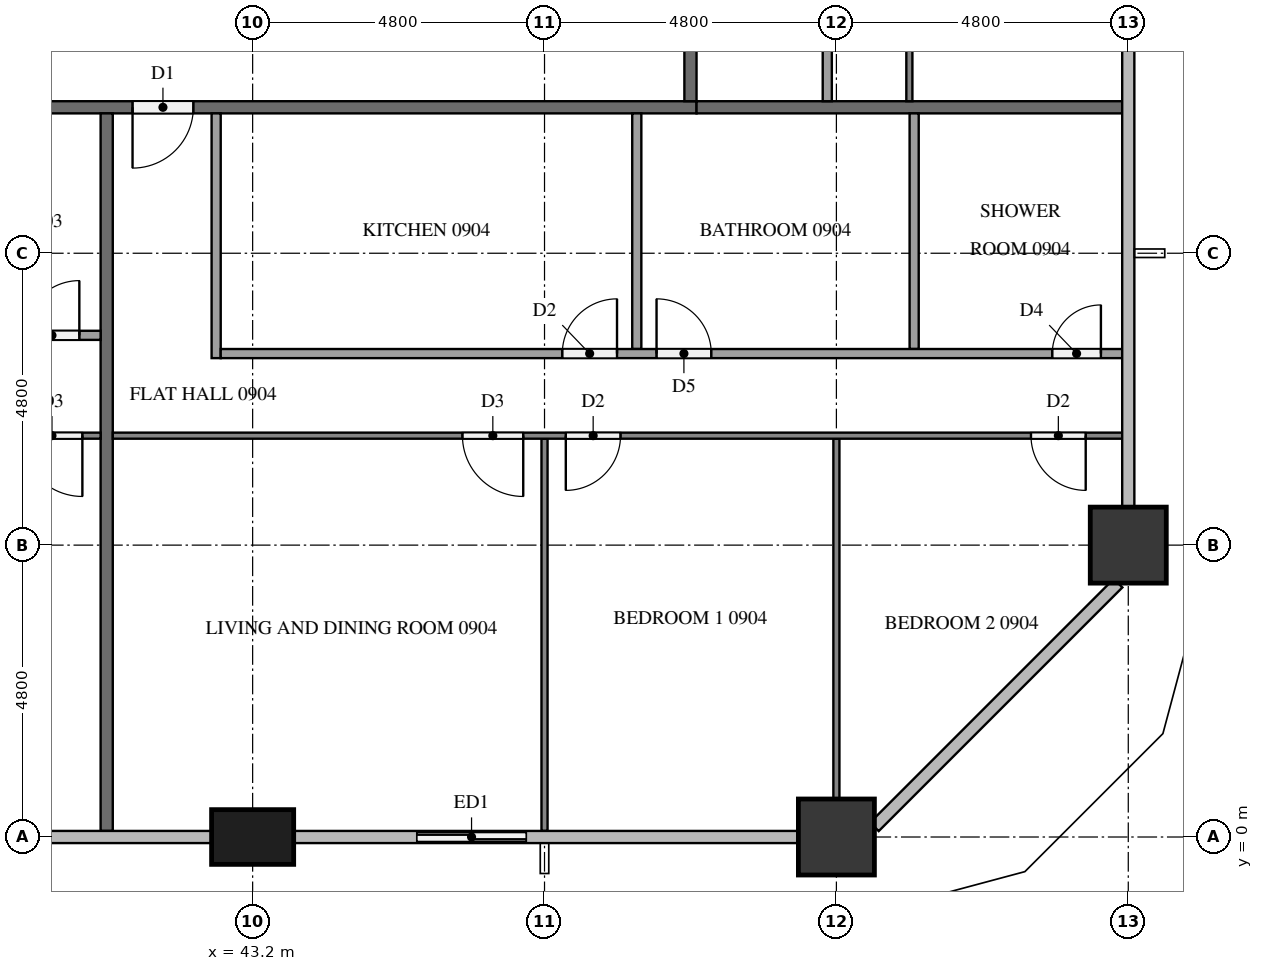
"""IFC4 building model, lengths in metres.
Left out: names, types, materials, properties, quantities, classifications, styles, units other than length and angle.
Written with IfcOpenShell. Run it as: python <this file> out.ifc"""

import sys

from ifc_helpers import new_model, si_unit, direction, frame, frame_2d, origin, origin_2d, place, context, subcontext, project, spatial, rectangle, extrude, element, fill, save


model = new_model("IFC4")
c1 = context("Model", 3, precision=1e-05, world=origin(), true_north=direction((0.0, 1.0)))
c2 = subcontext(c1, "Body", "Model", "MODEL_VIEW")
j1 = project(units=[si_unit("LENGTHUNIT", "METRE"), si_unit("PLANEANGLEUNIT", "RADIAN")], contexts=[c1])
p1 = place(None, origin())
s1 = spatial("IfcSite", under=j1, at=p1, CompositionType="ELEMENT")
p2 = place(p1, origin())
s2 = spatial("IfcBuilding", under=s1, at=p2, CompositionType="ELEMENT")
p3 = place(p2, frame((0.0, 0.0, 39.9)))
s3 = spatial("IfcBuildingStorey", under=s2, at=p3, CompositionType="ELEMENT", Elevation=39.9)
p4 = place(p3, frame((43.2, 0.0, 0.0), z_axis=(0.0, 0.0, 1.0), x_axis=(1.0, 0.0, 0.0)))
e1 = element("IfcColumn", 1, at=p4, inside=s3, PredefinedType="COLUMN", context=c2, shape_type="SweptSolid", body=[
    extrude(rectangle(XDim=1.35, YDim=0.9, at=origin_2d()), origin(), (0.0, 0.0, 1.0), 3.2),
])
for number, where, z_axis, x_axis in (
    (2, (52.8, 0.0, 0.0), (0.0, 0.0, 1.0), (1.0, 0.0, 0.0)),
    (3, (57.6, 4.8, 0.0), (0.0, 0.0, 1.0), (1.0, 0.0, 0.0)),
):
    element("IfcColumn", number, at=place(p3, frame(where, z_axis=z_axis, x_axis=x_axis)), inside=s3, PredefinedType="COLUMN", context=c2, shape_type="SweptSolid", body=[
        extrude(rectangle(XDim=1.25, YDim=1.25, at=origin_2d()), origin(), (0.0, 0.0, 1.0), 3.2),
    ])
p5 = place(p3, frame((45.6, 0.0, 0.0), z_axis=(0.0, 0.0, 1.0), x_axis=(1.0, 0.0, 0.0)))
e4 = element("IfcWall", 4, at=p5, inside=s3, PredefinedType="SOLIDWALL", context=c2, shape_type="SweptSolid", body=[
    extrude(rectangle(XDim=2.4, YDim=0.15, at=frame_2d((1.2, 0.0))), origin(), (0.0, 0.0, 1.0), 3.2),
])
p6 = place(p5, frame((0.3, 0.0, 0.0)))
e5 = element("IfcOpeningElement", 5, at=p6, cuts=e4, PredefinedType="OPENING", context=c2, shape_type="SweptSolid", body=[
    extrude(rectangle(XDim=1.8, YDim=2.4, at=frame_2d((0.9, 1.2))), frame((0.0, 0.085, 0.0), z_axis=(0.0, -1.0, 0.0), x_axis=(1.0, 0.0, 0.0)), (0.0, 0.0, 1.0), 0.17),
])
p7 = place(p3, frame((50.5, 12.0, 0.0), z_axis=(0.0, 0.0, 1.0), x_axis=(-1.0, 0.0, 0.0)))
e6 = element("IfcWall", 6, at=p7, inside=s3, PredefinedType="PARTITIONING", context=c2, shape_type="SweptSolid", body=[
    extrude(rectangle(XDim=38.6, YDim=0.2, at=frame_2d((19.3, 0.0))), origin(), (0.0, 0.0, 1.0), 3.2),
])
p8 = place(p7, frame((36.525, 0.0, 0.0)))
e7 = element("IfcOpeningElement", 7, at=p8, cuts=e6, PredefinedType="OPENING", context=c2, shape_type="SweptSolid", body=[
    extrude(rectangle(XDim=1.0, YDim=2.1, at=frame_2d((0.5, 1.05))), frame((0.0, 0.11, 0.0), z_axis=(0.0, -1.0, 0.0), x_axis=(1.0, 0.0, 0.0)), (0.0, 0.0, 1.0), 0.22),
])
p9 = place(p7, frame((24.525, 0.0, 0.0)))
e8 = element("IfcOpeningElement", 8, at=p9, cuts=e6, PredefinedType="OPENING", context=c2, shape_type="SweptSolid", body=[
    extrude(rectangle(XDim=1.0, YDim=2.1, at=frame_2d((0.5, 1.05))), frame((0.0, 0.11, 0.0), z_axis=(0.0, -1.0, 0.0), x_axis=(1.0, 0.0, 0.0)), (0.0, 0.0, 1.0), 0.22),
])
p10 = place(p7, frame((22.675, 0.0, 0.0)))
e9 = element("IfcOpeningElement", 9, at=p10, cuts=e6, PredefinedType="OPENING", context=c2, shape_type="SweptSolid", body=[
    extrude(rectangle(XDim=1.0, YDim=2.1, at=frame_2d((0.5, 1.05))), frame((0.0, 0.11, 0.0), z_axis=(0.0, -1.0, 0.0), x_axis=(1.0, 0.0, 0.0)), (0.0, 0.0, 1.0), 0.22),
])
p11 = place(p7, frame((8.275, 0.0, 0.0)))
e10 = element("IfcOpeningElement", 10, at=p11, cuts=e6, PredefinedType="OPENING", context=c2, shape_type="SweptSolid", body=[
    extrude(rectangle(XDim=1.0, YDim=2.1, at=frame_2d((0.5, 1.05))), frame((0.0, 0.11, 0.0), z_axis=(0.0, -1.0, 0.0), x_axis=(1.0, 0.0, 0.0)), (0.0, 0.0, 1.0), 0.22),
])
p12 = place(p3, frame((50.4, 40.7, 0.0), z_axis=(0.0, 0.0, 1.0), x_axis=(0.0, -1.0, 0.0)))
e11 = element("IfcWall", 11, at=p12, inside=s3, PredefinedType="PARTITIONING", context=c2, shape_type="SweptSolid", body=[
    extrude(rectangle(XDim=28.6, YDim=0.2, at=frame_2d((14.3, 0.0))), origin(), (0.0, 0.0, 1.0), 3.2),
])
p13 = place(p12, frame((17.125, 0.0, 0.0)))
e12 = element("IfcOpeningElement", 12, at=p13, cuts=e11, PredefinedType="OPENING", context=c2, shape_type="SweptSolid", body=[
    extrude(rectangle(XDim=1.0, YDim=2.1, at=frame_2d((0.5, 1.05))), frame((0.0, 0.11, 0.0), z_axis=(0.0, -1.0, 0.0), x_axis=(1.0, 0.0, 0.0)), (0.0, 0.0, 1.0), 0.22),
])
p14 = place(p12, frame((15.275, 0.0, 0.0)))
e13 = element("IfcOpeningElement", 13, at=p14, cuts=e11, PredefinedType="OPENING", context=c2, shape_type="SweptSolid", body=[
    extrude(rectangle(XDim=1.0, YDim=2.1, at=frame_2d((0.5, 1.05))), frame((0.0, 0.11, 0.0), z_axis=(0.0, -1.0, 0.0), x_axis=(1.0, 0.0, 0.0)), (0.0, 0.0, 1.0), 0.22),
])
p15 = place(p12, frame((5.675, 0.0, 0.0)))
e14 = element("IfcOpeningElement", 14, at=p15, cuts=e11, PredefinedType="OPENING", context=c2, shape_type="SweptSolid", body=[
    extrude(rectangle(XDim=1.0, YDim=2.1, at=frame_2d((0.5, 1.05))), frame((0.0, 0.11, 0.0), z_axis=(0.0, -1.0, 0.0), x_axis=(1.0, 0.0, 0.0)), (0.0, 0.0, 1.0), 0.22),
])
p16 = place(p3, frame((40.8, 11.9, 0.0), z_axis=(0.0, 0.0, 1.0), x_axis=(0.0, -1.0, 0.0)))
e15 = element("IfcWall", 15, at=p16, inside=s3, PredefinedType="PARTITIONING", context=c2, shape_type="SweptSolid", body=[
    extrude(rectangle(XDim=11.8, YDim=0.2, at=frame_2d((5.9, 0.0))), origin(), (0.0, 0.0, 1.0), 3.2),
])
p17 = place(p3, frame((50.5, 12.0, 0.0), z_axis=(0.0, 0.0, 1.0), x_axis=(1.0, 0.0, 0.0)))
e16 = element("IfcWall", 16, at=p17, inside=s3, PredefinedType="PARTITIONING", context=c2, shape_type="SweptSolid", body=[
    extrude(rectangle(XDim=7.0, YDim=0.2, at=frame_2d((3.5, 0.0))), origin(), (0.0, 0.0, 1.0), 3.2),
])
p18 = place(p3, frame((40.7, 6.6, 0.0), z_axis=(0.0, 0.0, 1.0), x_axis=(-1.0, 0.0, 0.0)))
e17 = element("IfcWall", 17, at=p18, inside=s3, PredefinedType="PARTITIONING", context=c2, shape_type="SweptSolid", body=[
    extrude(rectangle(XDim=14.2, YDim=0.1, at=frame_2d((7.1, 0.0))), origin(), (0.0, 0.0, 1.0), 3.2),
])
p19 = place(p18, frame((9.85, 0.0, 0.0)))
e18 = element("IfcOpeningElement", 18, at=p19, cuts=e17, PredefinedType="OPENING", context=c2, shape_type="SweptSolid", body=[
    extrude(rectangle(XDim=0.9, YDim=2.1, at=frame_2d((0.45, 1.05))), frame((0.0, 0.06, 0.0), z_axis=(0.0, -1.0, 0.0), x_axis=(1.0, 0.0, 0.0)), (0.0, 0.0, 1.0), 0.12),
])
p20 = place(p18, frame((8.25, 0.0, 0.0)))
e19 = element("IfcOpeningElement", 19, at=p20, cuts=e17, PredefinedType="OPENING", context=c2, shape_type="SweptSolid", body=[
    extrude(rectangle(XDim=0.9, YDim=2.1, at=frame_2d((0.45, 1.05))), frame((0.0, 0.06, 0.0), z_axis=(0.0, -1.0, 0.0), x_axis=(1.0, 0.0, 0.0)), (0.0, 0.0, 1.0), 0.12),
])
p21 = place(p18, frame((0.3, 0.0, 0.0)))
e20 = element("IfcOpeningElement", 20, at=p21, cuts=e17, PredefinedType="OPENING", context=c2, shape_type="SweptSolid", body=[
    extrude(rectangle(XDim=1.0, YDim=2.1, at=frame_2d((0.5, 1.05))), frame((0.0, 0.06, 0.0), z_axis=(0.0, -1.0, 0.0), x_axis=(1.0, 0.0, 0.0)), (0.0, 0.0, 1.0), 0.12),
])
p22 = place(p3, frame((28.275, 8.25, 0.0), z_axis=(0.0, 0.0, 1.0), x_axis=(1.0, 0.0, 0.0)))
e21 = element("IfcWall", 21, at=p22, inside=s3, PredefinedType="PARTITIONING", context=c2, shape_type="SweptSolid", body=[
    extrude(rectangle(XDim=12.425, YDim=0.15, at=frame_2d((6.212, 0.0))), origin(), (0.0, 0.0, 1.0), 3.2),
])
p23 = place(p22, frame((4.51, 0.0, 0.0)))
e22 = element("IfcOpeningElement", 22, at=p23, cuts=e21, PredefinedType="OPENING", context=c2, shape_type="SweptSolid", body=[
    extrude(rectangle(XDim=0.9, YDim=2.1, at=frame_2d((0.45, 1.05))), frame((0.0, 0.085, 0.0), z_axis=(0.0, -1.0, 0.0), x_axis=(1.0, 0.0, 0.0)), (0.0, 0.0, 1.0), 0.17),
])
p24 = place(p22, frame((6.06, 0.0, 0.0)))
e23 = element("IfcOpeningElement", 23, at=p24, cuts=e21, PredefinedType="OPENING", context=c2, shape_type="SweptSolid", body=[
    extrude(rectangle(XDim=0.8, YDim=2.1, at=frame_2d((0.4, 1.05))), frame((0.0, 0.085, 0.0), z_axis=(0.0, -1.0, 0.0), x_axis=(1.0, 0.0, 0.0)), (0.0, 0.0, 1.0), 0.17),
])
p25 = place(p22, frame((11.175, 0.0, 0.0)))
e24 = element("IfcOpeningElement", 24, at=p25, cuts=e21, PredefinedType="OPENING", context=c2, shape_type="SweptSolid", body=[
    extrude(rectangle(XDim=0.9, YDim=2.1, at=frame_2d((0.45, 1.05))), frame((0.0, 0.085, 0.0), z_axis=(0.0, -1.0, 0.0), x_axis=(1.0, 0.0, 0.0)), (0.0, 0.0, 1.0), 0.17),
])
p26 = place(p3, frame((48.0, 6.55, 0.0), z_axis=(0.0, 0.0, 1.0), x_axis=(0.0, -1.0, 0.0)))
e25 = element("IfcWall", 25, at=p26, inside=s3, PredefinedType="PARTITIONING", context=c2, shape_type="SweptSolid", body=[
    extrude(rectangle(XDim=6.45, YDim=0.1, at=frame_2d((3.225, 0.0))), origin(), (0.0, 0.0, 1.0), 3.2),
])
p27 = place(p3, frame((52.8, 6.55, 0.0), z_axis=(0.0, 0.0, 1.0), x_axis=(0.0, -1.0, 0.0)))
e26 = element("IfcWall", 26, at=p27, inside=s3, PredefinedType="PARTITIONING", context=c2, shape_type="SweptSolid", body=[
    extrude(rectangle(XDim=5.925, YDim=0.1, at=frame_2d((2.962, 0.0))), origin(), (0.0, 0.0, 1.0), 3.2),
])
p28 = place(p3, frame((57.5, 6.6, 0.0), z_axis=(0.0, 0.0, 1.0), x_axis=(-1.0, 0.0, 0.0)))
e27 = element("IfcWall", 27, at=p28, inside=s3, PredefinedType="PARTITIONING", context=c2, shape_type="SweptSolid", body=[
    extrude(rectangle(XDim=16.6, YDim=0.1, at=frame_2d((8.3, 0.0))), origin(), (0.0, 0.0, 1.0), 3.2),
])
p29 = place(p28, frame((9.85, 0.0, 0.0)))
e28 = element("IfcOpeningElement", 28, at=p29, cuts=e27, PredefinedType="OPENING", context=c2, shape_type="SweptSolid", body=[
    extrude(rectangle(XDim=1.0, YDim=2.1, at=frame_2d((0.5, 1.05))), frame((0.0, 0.06, 0.0), z_axis=(0.0, -1.0, 0.0), x_axis=(1.0, 0.0, 0.0)), (0.0, 0.0, 1.0), 0.12),
])
p30 = place(p28, frame((8.25, 0.0, 0.0)))
e29 = element("IfcOpeningElement", 29, at=p30, cuts=e27, PredefinedType="OPENING", context=c2, shape_type="SweptSolid", body=[
    extrude(rectangle(XDim=0.9, YDim=2.1, at=frame_2d((0.45, 1.05))), frame((0.0, 0.06, 0.0), z_axis=(0.0, -1.0, 0.0), x_axis=(1.0, 0.0, 0.0)), (0.0, 0.0, 1.0), 0.12),
])
p31 = place(p28, frame((0.6, 0.0, 0.0)))
e30 = element("IfcOpeningElement", 30, at=p31, cuts=e27, PredefinedType="OPENING", context=c2, shape_type="SweptSolid", body=[
    extrude(rectangle(XDim=0.9, YDim=2.1, at=frame_2d((0.45, 1.05))), frame((0.0, 0.06, 0.0), z_axis=(0.0, -1.0, 0.0), x_axis=(1.0, 0.0, 0.0)), (0.0, 0.0, 1.0), 0.12),
])
for number, where, z_axis, x_axis in (
    (31, (49.517, 11.9, 0.0), (0.0, 0.0, 1.0), (0.0, -1.0, 0.0)),
    (32, (54.079, 11.9, 0.0), (0.0, 0.0, 1.0), (0.0, -1.0, 0.0)),
):
    element("IfcWall", number, at=place(p3, frame(where, z_axis=z_axis, x_axis=x_axis)), inside=s3, PredefinedType="PARTITIONING", context=c2, shape_type="SweptSolid", body=[
        extrude(rectangle(XDim=3.875, YDim=0.15, at=frame_2d((1.938, 0.0))), origin(), (0.0, 0.0, 1.0), 3.2),
    ])
p32 = place(p3, frame((42.6, 11.9, 0.0), z_axis=(0.0, 0.0, 1.0), x_axis=(0.0, -1.0, 0.0)))
e33 = element("IfcWall", 33, at=p32, inside=s3, PredefinedType="PARTITIONING", context=c2, shape_type="SweptSolid", body=[
    extrude(rectangle(XDim=4.025, YDim=0.15, at=frame_2d((2.012, 0.0))), origin(), (0.0, 0.0, 1.0), 3.2),
])
p33 = place(p3, frame((42.675, 7.95, 0.0), z_axis=(0.0, 0.0, 1.0), x_axis=(1.0, 0.0, 0.0)))
e34 = element("IfcWall", 34, at=p33, inside=s3, PredefinedType="PARTITIONING", context=c2, shape_type="SweptSolid", body=[
    extrude(rectangle(XDim=14.825, YDim=0.15, at=frame_2d((7.413, 0.0))), origin(), (0.0, 0.0, 1.0), 3.2),
])
p34 = place(p33, frame((5.617, 0.0, 0.0)))
e35 = element("IfcOpeningElement", 35, at=p34, cuts=e34, PredefinedType="OPENING", context=c2, shape_type="SweptSolid", body=[
    extrude(rectangle(XDim=0.9, YDim=2.1, at=frame_2d((0.45, 1.05))), frame((0.0, 0.085, 0.0), z_axis=(0.0, -1.0, 0.0), x_axis=(1.0, 0.0, 0.0)), (0.0, 0.0, 1.0), 0.17),
])
p35 = place(p33, frame((7.167, 0.0, 0.0)))
e36 = element("IfcOpeningElement", 36, at=p35, cuts=e34, PredefinedType="OPENING", context=c2, shape_type="SweptSolid", body=[
    extrude(rectangle(XDim=0.9, YDim=2.1, at=frame_2d((0.45, 1.05))), frame((0.0, 0.085, 0.0), z_axis=(0.0, -1.0, 0.0), x_axis=(1.0, 0.0, 0.0)), (0.0, 0.0, 1.0), 0.17),
])
p36 = place(p33, frame((13.675, 0.0, 0.0)))
e37 = element("IfcOpeningElement", 37, at=p36, cuts=e34, PredefinedType="OPENING", context=c2, shape_type="SweptSolid", body=[
    extrude(rectangle(XDim=0.8, YDim=2.1, at=frame_2d((0.4, 1.05))), frame((0.0, 0.085, 0.0), z_axis=(0.0, -1.0, 0.0), x_axis=(1.0, 0.0, 0.0)), (0.0, 0.0, 1.0), 0.17),
])
p37 = place(p3, frame((54.0, 23.9, 0.0), z_axis=(0.0, 0.0, 1.0), x_axis=(0.0, -1.0, 0.0)))
e38 = element("IfcWall", 38, at=p37, inside=s3, PredefinedType="PARTITIONING", context=c2, shape_type="SweptSolid", body=[
    extrude(rectangle(XDim=11.8, YDim=0.1, at=frame_2d((5.9, 0.0))), origin(), (0.0, 0.0, 1.0), 3.2),
])
p38 = place(p37, frame((5.75, 0.0, 0.0)))
e39 = element("IfcOpeningElement", 39, at=p38, cuts=e38, PredefinedType="OPENING", context=c2, shape_type="SweptSolid", body=[
    extrude(rectangle(XDim=1.0, YDim=2.1, at=frame_2d((0.5, 1.05))), frame((0.0, 0.06, 0.0), z_axis=(0.0, -1.0, 0.0), x_axis=(1.0, 0.0, 0.0)), (0.0, 0.0, 1.0), 0.12),
])
p39 = place(p37, frame((7.45, 0.0, 0.0)))
e40 = element("IfcOpeningElement", 40, at=p39, cuts=e38, PredefinedType="OPENING", context=c2, shape_type="SweptSolid", body=[
    extrude(rectangle(XDim=0.9, YDim=2.1, at=frame_2d((0.45, 1.05))), frame((0.0, 0.06, 0.0), z_axis=(0.0, -1.0, 0.0), x_axis=(1.0, 0.0, 0.0)), (0.0, 0.0, 1.0), 0.12),
])
p40 = place(p3, frame((52.65, 12.1, 0.0), z_axis=(0.0, 0.0, 1.0), x_axis=(0.0, 1.0, 0.0)))
e41 = element("IfcWall", 41, at=p40, inside=s3, PredefinedType="PARTITIONING", context=c2, shape_type="SweptSolid", body=[
    extrude(rectangle(XDim=10.025, YDim=0.15, at=frame_2d((5.012, 0.0))), origin(), (0.0, 0.0, 1.0), 3.2),
])
p41 = place(p40, frame((6.34, 0.0, 0.0)))
e42 = element("IfcOpeningElement", 42, at=p41, cuts=e41, PredefinedType="OPENING", context=c2, shape_type="SweptSolid", body=[
    extrude(rectangle(XDim=0.8, YDim=2.1, at=frame_2d((0.4, 1.05))), frame((0.0, 0.085, 0.0), z_axis=(0.0, -1.0, 0.0), x_axis=(1.0, 0.0, 0.0)), (0.0, 0.0, 1.0), 0.17),
])
p42 = place(p40, frame((4.79, 0.0, 0.0)))
e43 = element("IfcOpeningElement", 43, at=p42, cuts=e41, PredefinedType="OPENING", context=c2, shape_type="SweptSolid", body=[
    extrude(rectangle(XDim=0.9, YDim=2.1, at=frame_2d((0.45, 1.05))), frame((0.0, 0.085, 0.0), z_axis=(0.0, -1.0, 0.0), x_axis=(1.0, 0.0, 0.0)), (0.0, 0.0, 1.0), 0.17),
])
p43 = place(p6, origin())
e44 = element("IfcDoor", 44, at=p43, inside=s3, OperationType="SLIDING_TO_LEFT", PredefinedType="DOOR", context=c2, shape_type="SweptSolid", body=[
    extrude(rectangle(XDim=1.8, YDim=2.4, at=frame_2d((0.9, 1.2))), frame((0.0, 0.025, 0.0), z_axis=(0.0, -1.0, 0.0), x_axis=(1.0, 0.0, 0.0)), (0.0, 0.0, 1.0), 0.05),
])
fill(e5, e44)
p44 = place(p11, origin())
e45 = element("IfcDoor", 45, at=p44, inside=s3, OperationType="SINGLE_SWING_RIGHT", PredefinedType="DOOR", context=c2, shape_type="SweptSolid", body=[
    extrude(rectangle(XDim=1.0, YDim=2.1, at=frame_2d((0.5, 1.05))), frame((0.0, 0.025, 0.0), z_axis=(0.0, -1.0, 0.0), x_axis=(1.0, 0.0, 0.0)), (0.0, 0.0, 1.0), 0.05),
])
fill(e10, e45)
p45 = place(p21, origin())
e46 = element("IfcDoor", 46, at=p45, inside=s3, OperationType="SINGLE_SWING_LEFT", PredefinedType="DOOR", context=c2, shape_type="SweptSolid", body=[
    extrude(rectangle(XDim=1.0, YDim=2.1, at=frame_2d((0.5, 1.05))), frame((0.0, 0.025, 0.0), z_axis=(0.0, -1.0, 0.0), x_axis=(1.0, 0.0, 0.0)), (0.0, 0.0, 1.0), 0.05),
])
fill(e20, e46)
p46 = place(p25, origin())
e47 = element("IfcDoor", 47, at=p46, inside=s3, OperationType="SINGLE_SWING_RIGHT", PredefinedType="DOOR", context=c2, shape_type="SweptSolid", body=[
    extrude(rectangle(XDim=0.9, YDim=2.1, at=frame_2d((0.45, 1.05))), frame((0.0, 0.025, 0.0), z_axis=(0.0, -1.0, 0.0), x_axis=(1.0, 0.0, 0.0)), (0.0, 0.0, 1.0), 0.05),
])
fill(e24, e47)
p47 = place(p29, origin())
e48 = element("IfcDoor", 48, at=p47, inside=s3, OperationType="SINGLE_SWING_LEFT", PredefinedType="DOOR", context=c2, shape_type="SweptSolid", body=[
    extrude(rectangle(XDim=1.0, YDim=2.1, at=frame_2d((0.5, 1.05))), frame((0.0, 0.025, 0.0), z_axis=(0.0, -1.0, 0.0), x_axis=(1.0, 0.0, 0.0)), (0.0, 0.0, 1.0), 0.05),
])
fill(e28, e48)
p48 = place(p30, origin())
e49 = element("IfcDoor", 49, at=p48, inside=s3, OperationType="SINGLE_SWING_RIGHT", PredefinedType="DOOR", context=c2, shape_type="SweptSolid", body=[
    extrude(rectangle(XDim=0.9, YDim=2.1, at=frame_2d((0.45, 1.05))), frame((0.0, 0.025, 0.0), z_axis=(0.0, -1.0, 0.0), x_axis=(1.0, 0.0, 0.0)), (0.0, 0.0, 1.0), 0.05),
])
fill(e29, e49)
p49 = place(p31, origin())
e50 = element("IfcDoor", 50, at=p49, inside=s3, OperationType="SINGLE_SWING_LEFT", PredefinedType="DOOR", context=c2, shape_type="SweptSolid", body=[
    extrude(rectangle(XDim=0.9, YDim=2.1, at=frame_2d((0.45, 1.05))), frame((0.0, 0.025, 0.0), z_axis=(0.0, -1.0, 0.0), x_axis=(1.0, 0.0, 0.0)), (0.0, 0.0, 1.0), 0.05),
])
fill(e30, e50)
p50 = place(p34, origin())
e51 = element("IfcDoor", 51, at=p50, inside=s3, OperationType="SINGLE_SWING_RIGHT", PredefinedType="DOOR", context=c2, shape_type="SweptSolid", body=[
    extrude(rectangle(XDim=0.9, YDim=2.1, at=frame_2d((0.45, 1.05))), frame((0.0, 0.025, 0.0), z_axis=(0.0, -1.0, 0.0), x_axis=(1.0, 0.0, 0.0)), (0.0, 0.0, 1.0), 0.05),
])
fill(e35, e51)
p51 = place(p35, origin())
e52 = element("IfcDoor", 52, at=p51, inside=s3, OperationType="SINGLE_SWING_LEFT", PredefinedType="DOOR", context=c2, shape_type="SweptSolid", body=[
    extrude(rectangle(XDim=0.9, YDim=2.1, at=frame_2d((0.45, 1.05))), frame((0.0, 0.025, 0.0), z_axis=(0.0, -1.0, 0.0), x_axis=(1.0, 0.0, 0.0)), (0.0, 0.0, 1.0), 0.05),
])
fill(e36, e52)
p52 = place(p36, origin())
e53 = element("IfcDoor", 53, at=p52, inside=s3, OperationType="SINGLE_SWING_RIGHT", PredefinedType="DOOR", context=c2, shape_type="SweptSolid", body=[
    extrude(rectangle(XDim=0.8, YDim=2.1, at=frame_2d((0.4, 1.05))), frame((0.0, 0.025, 0.0), z_axis=(0.0, -1.0, 0.0), x_axis=(1.0, 0.0, 0.0)), (0.0, 0.0, 1.0), 0.05),
])
fill(e37, e53)
save(model, sys.argv[1])
